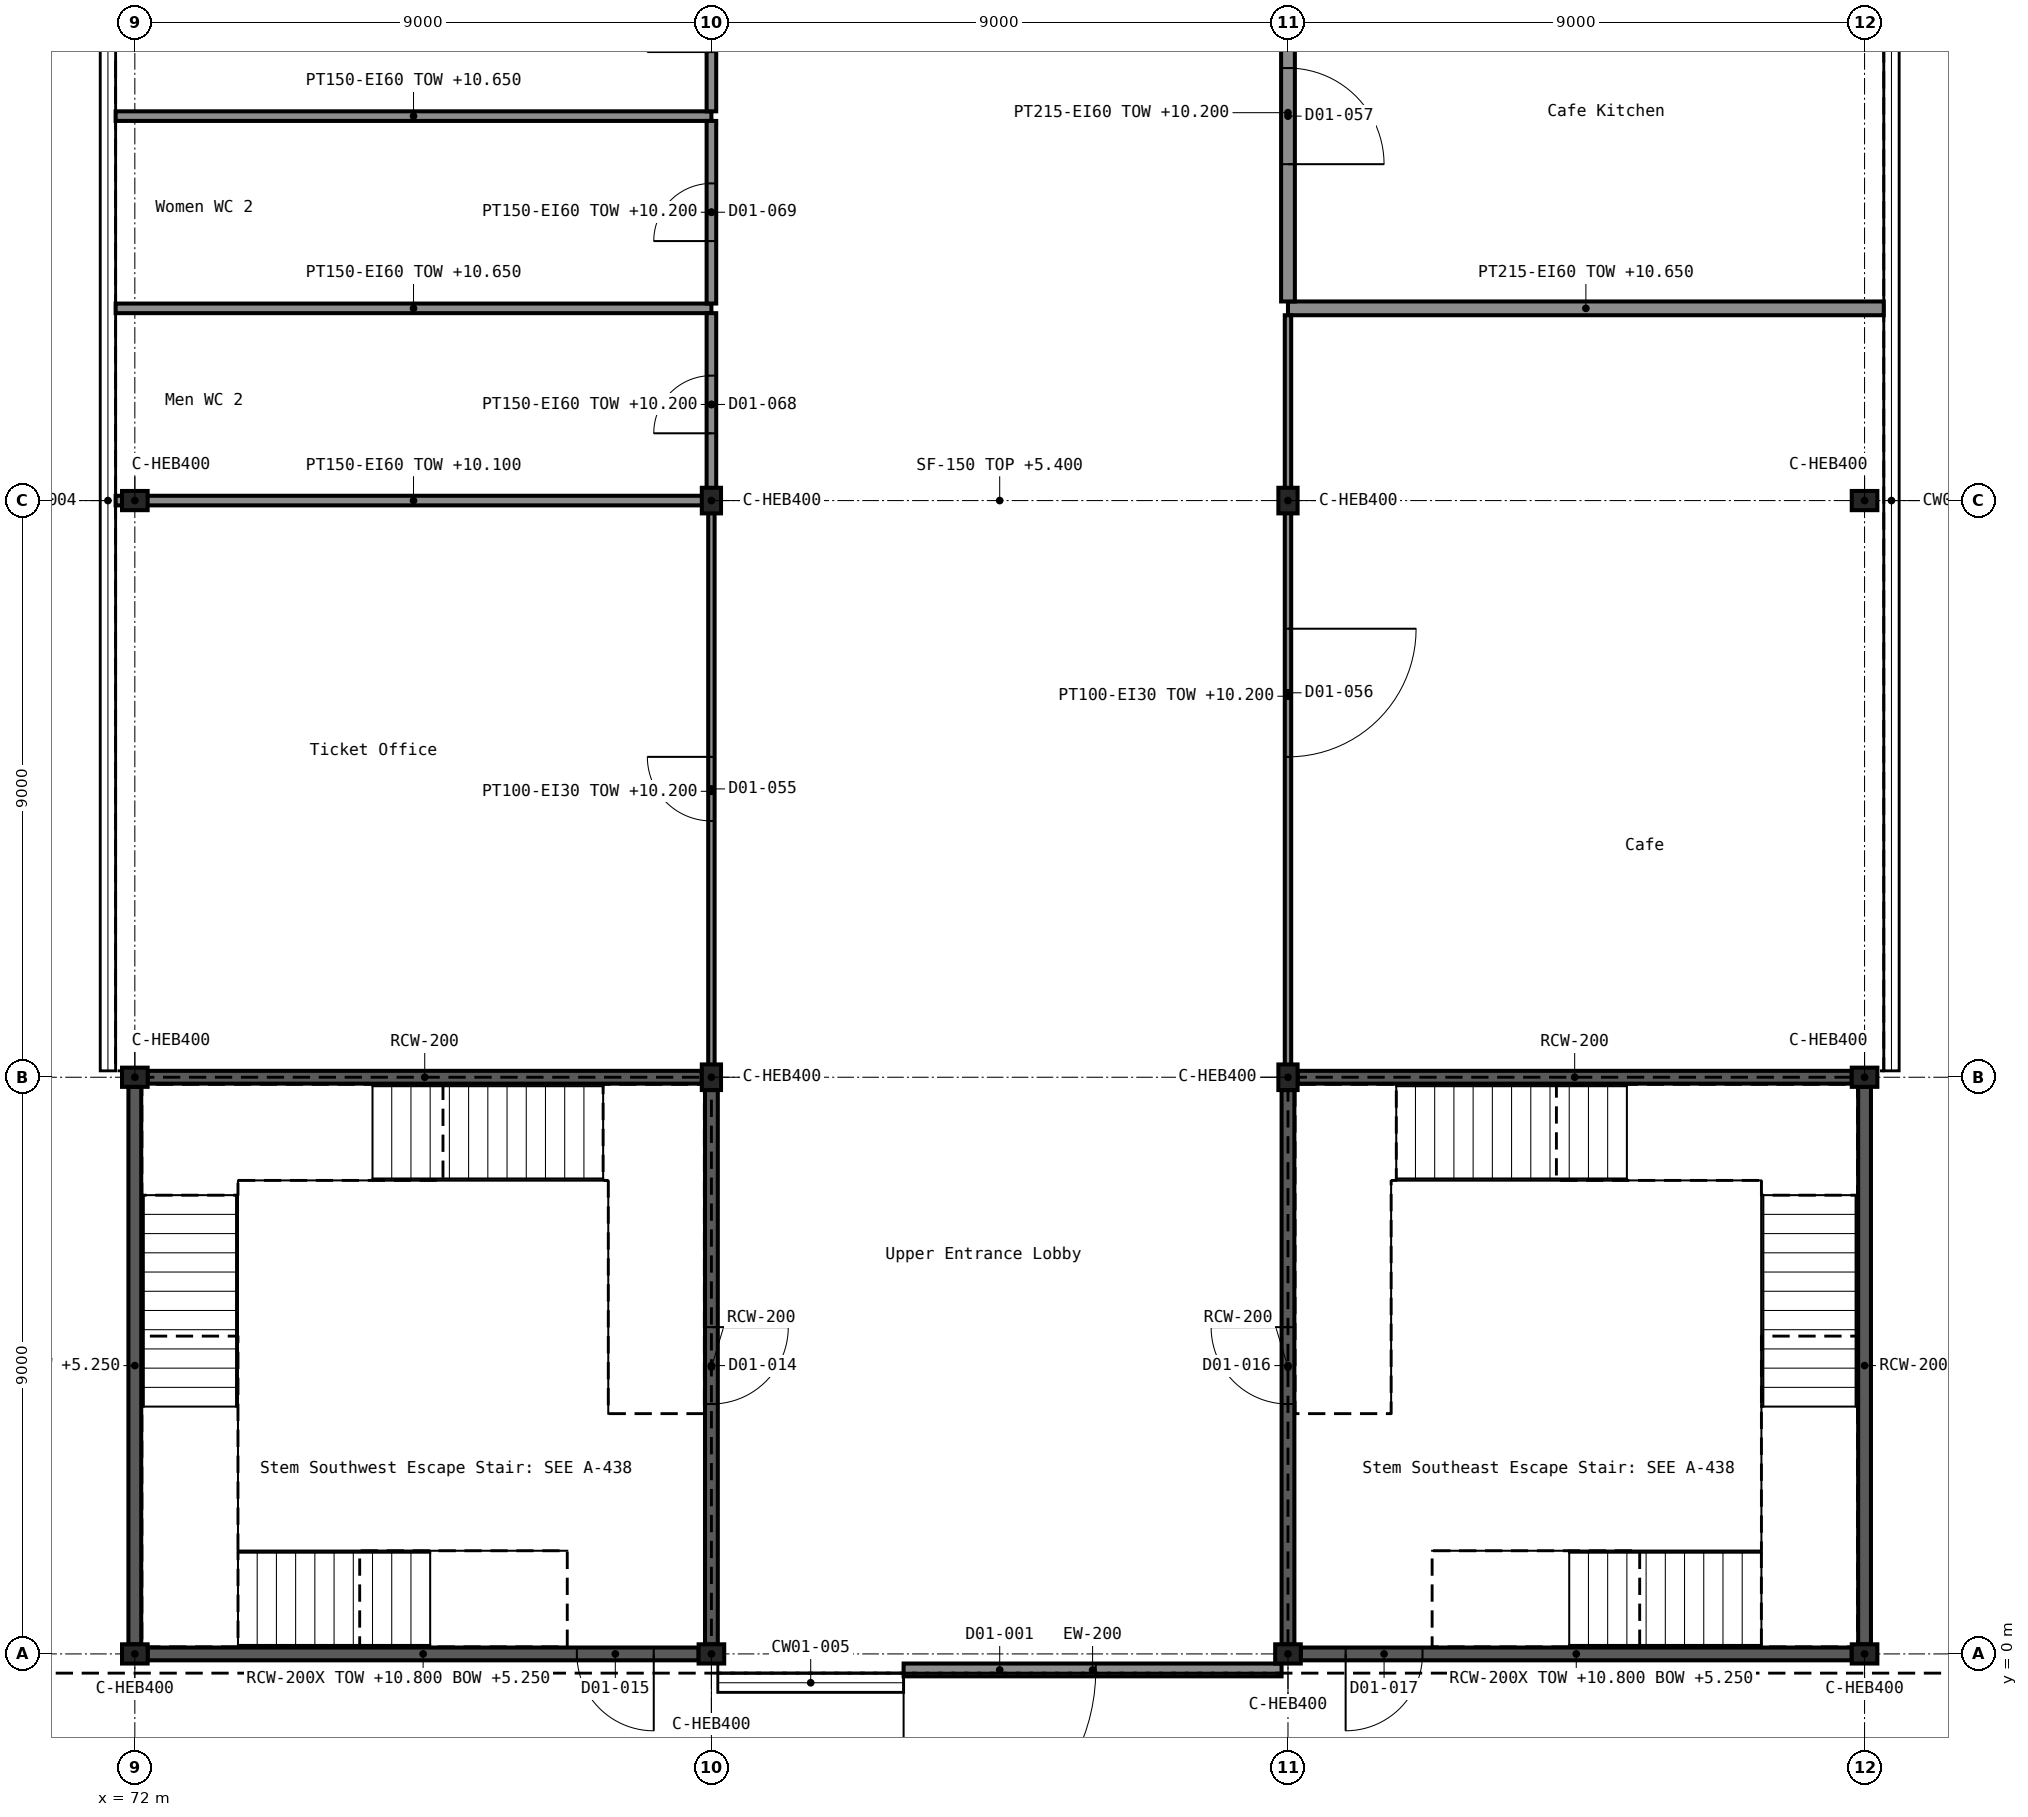
"""IFC4 building model, lengths in metres.
Left out: names, types, materials, properties, quantities, classifications, styles, units other than length and angle.
Written with IfcOpenShell. Run it as: python <this file> out.ifc"""

import sys

from ifc_helpers import new_model, si_unit, direction, frame, frame_2d, origin, origin_2d, place, context, subcontext, project, spatial, rectangle, i_section, extrude, element, fill, save


model = new_model("IFC4")
c1 = context("Model", 3, precision=1e-05, world=origin(), true_north=direction((0.0, 1.0)))
c2 = subcontext(c1, "Body", "Model", "MODEL_VIEW")
j1 = project(units=[si_unit("LENGTHUNIT", "METRE"), si_unit("PLANEANGLEUNIT", "RADIAN")], contexts=[c1])
p1 = place(None, origin())
s1 = spatial("IfcSite", under=j1, at=p1, CompositionType="ELEMENT")
p2 = place(p1, origin())
s2 = spatial("IfcBuilding", under=s1, at=p2, CompositionType="ELEMENT")
p3 = place(p2, frame((0.0, 0.0, 5.4)))
s3 = spatial("IfcBuildingStorey", under=s2, at=p3, CompositionType="ELEMENT", Elevation=5.4)
for number, where, z_axis, x_axis in (
    (1, (72.0, 0.0, 0.0), (0.0, 0.0, 1.0), (0.0, 1.0, 0.0)),
    (2, (81.0, 0.0, 0.0), (0.0, 0.0, 1.0), (0.0, 1.0, 0.0)),
    (3, (90.0, 0.0, 0.0), (0.0, 0.0, 1.0), (0.0, 1.0, 0.0)),
    (4, (99.0, 0.0, 0.0), (0.0, 0.0, 1.0), (0.0, 1.0, 0.0)),
    (5, (72.0, 9.0, 0.0), (0.0, 0.0, 1.0), (0.0, 1.0, 0.0)),
    (6, (81.0, 9.0, 0.0), (0.0, 0.0, 1.0), (1.0, 0.0, 0.0)),
    (7, (90.0, 9.0, 0.0), (0.0, 0.0, 1.0), (1.0, 0.0, 0.0)),
    (8, (99.0, 9.0, 0.0), (0.0, 0.0, 1.0), (0.0, 1.0, 0.0)),
    (9, (72.0, 18.0, 0.0), (0.0, 0.0, 1.0), (0.0, 1.0, 0.0)),
    (10, (81.0, 18.0, 0.0), (0.0, 0.0, 1.0), (1.0, 0.0, 0.0)),
    (11, (90.0, 18.0, 0.0), (0.0, 0.0, 1.0), (1.0, 0.0, 0.0)),
    (12, (99.0, 18.0, 0.0), (0.0, 0.0, 1.0), (0.0, 1.0, 0.0)),
):
    element("IfcColumn", number, at=place(p3, frame(where, z_axis=z_axis, x_axis=x_axis)), inside=s3, PredefinedType="COLUMN", context=c2, shape_type="SweptSolid", body=[
        extrude(i_section(OverallWidth=0.3, OverallDepth=0.4, WebThickness=0.013, FlangeThickness=0.024, FilletRadius=0.027, at=origin_2d()), origin(), (0.0, 0.0, 1.0), 5.4),
    ])
p4 = place(p3, frame((84.0, -0.25, 0.0), z_axis=(0.0, 0.0, 1.0), x_axis=(1.0, 0.0, 0.0)))
e13 = element("IfcWall", 13, at=p4, inside=s3, PredefinedType="SOLIDWALL", context=c2, shape_type="SweptSolid", body=[
    extrude(rectangle(XDim=5.9, YDim=0.2, at=frame_2d((2.95, 0.0))), origin(), (0.0, 0.0, 1.0), 5.4),
])
p5 = place(p4, origin())
e14 = element("IfcOpeningElement", 14, at=p5, cuts=e13, PredefinedType="OPENING", context=c2, shape_type="SweptSolid", body=[
    extrude(rectangle(XDim=3.0, YDim=2.4, at=frame_2d((1.5, 1.2))), frame((0.0, 0.111, 0.0), z_axis=(0.0, -1.0, 0.0), x_axis=(1.0, 0.0, 0.0)), (0.0, 0.0, 1.0), 0.222),
])
p6 = place(p3, frame((72.2, 0.0, -0.15), z_axis=(0.0, 0.0, 1.0), x_axis=(1.0, 0.0, 0.0)))
e15 = element("IfcWall", 15, at=p6, inside=s3, PredefinedType="SHEAR", context=c2, shape_type="SweptSolid", body=[
    extrude(rectangle(XDim=8.6, YDim=0.2, at=frame_2d((4.3, 0.0))), origin(), (0.0, 0.0, 1.0), 5.55),
])
p7 = place(p6, frame((6.7, 0.0, 0.15)))
e16 = element("IfcOpeningElement", 16, at=p7, cuts=e15, PredefinedType="OPENING", context=c2, shape_type="SweptSolid", body=[
    extrude(rectangle(XDim=1.2, YDim=2.1, at=frame_2d((0.6, 1.05))), frame((0.0, 0.111, 0.0), z_axis=(0.0, -1.0, 0.0), x_axis=(1.0, 0.0, 0.0)), (0.0, 0.0, 1.0), 0.222),
])
p8 = place(p3, frame((72.2, 9.0, 0.0), z_axis=(0.0, 0.0, 1.0), x_axis=(1.0, 0.0, 0.0)))
e17 = element("IfcWall", 17, at=p8, inside=s3, PredefinedType="SHEAR", context=c2, shape_type="SweptSolid", body=[
    extrude(rectangle(XDim=8.65, YDim=0.2, at=frame_2d((4.325, 0.0))), origin(), (0.0, 0.0, 1.0), 5.4),
])
p9 = place(p3, frame((72.0, 0.15, -0.15), z_axis=(0.0, 0.0, 1.0), x_axis=(0.0, 1.0, 0.0)))
e18 = element("IfcWall", 18, at=p9, inside=s3, PredefinedType="SHEAR", context=c2, shape_type="SweptSolid", body=[
    extrude(rectangle(XDim=8.7, YDim=0.2, at=frame_2d((4.35, 0.0))), origin(), (0.0, 0.0, 1.0), 5.55),
])
p10 = place(p3, frame((81.0, 0.15, 0.0), z_axis=(0.0, 0.0, 1.0), x_axis=(0.0, 1.0, 0.0)))
e19 = element("IfcWall", 19, at=p10, inside=s3, PredefinedType="SHEAR", context=c2, shape_type="SweptSolid", body=[
    extrude(rectangle(XDim=8.65, YDim=0.2, at=frame_2d((4.325, 0.0))), origin(), (0.0, 0.0, 1.0), 5.4),
])
p11 = place(p10, frame((3.75, 0.0, 0.0)))
e20 = element("IfcOpeningElement", 20, at=p11, cuts=e19, PredefinedType="OPENING", context=c2, shape_type="SweptSolid", body=[
    extrude(rectangle(XDim=1.2, YDim=2.1, at=frame_2d((0.6, 1.05))), frame((0.0, 0.111, 0.0), z_axis=(0.0, -1.0, 0.0), x_axis=(1.0, 0.0, 0.0)), (0.0, 0.0, 1.0), 0.222),
])
p12 = place(p3, frame((90.2, 0.0, -0.15), z_axis=(0.0, 0.0, 1.0), x_axis=(1.0, 0.0, 0.0)))
e21 = element("IfcWall", 21, at=p12, inside=s3, PredefinedType="SHEAR", context=c2, shape_type="SweptSolid", body=[
    extrude(rectangle(XDim=8.6, YDim=0.2, at=frame_2d((4.3, 0.0))), origin(), (0.0, 0.0, 1.0), 5.55),
])
p13 = place(p12, frame((0.7, 0.0, 0.15)))
e22 = element("IfcOpeningElement", 22, at=p13, cuts=e21, PredefinedType="OPENING", context=c2, shape_type="SweptSolid", body=[
    extrude(rectangle(XDim=1.2, YDim=2.1, at=frame_2d((0.6, 1.05))), frame((0.0, 0.111, 0.0), z_axis=(0.0, -1.0, 0.0), x_axis=(1.0, 0.0, 0.0)), (0.0, 0.0, 1.0), 0.222),
])
p14 = place(p3, frame((90.15, 9.0, 0.0), z_axis=(0.0, 0.0, 1.0), x_axis=(1.0, 0.0, 0.0)))
e23 = element("IfcWall", 23, at=p14, inside=s3, PredefinedType="SHEAR", context=c2, shape_type="SweptSolid", body=[
    extrude(rectangle(XDim=8.65, YDim=0.2, at=frame_2d((4.325, 0.0))), origin(), (0.0, 0.0, 1.0), 5.4),
])
p15 = place(p3, frame((90.0, 0.15, 0.0), z_axis=(0.0, 0.0, 1.0), x_axis=(0.0, 1.0, 0.0)))
e24 = element("IfcWall", 24, at=p15, inside=s3, PredefinedType="SHEAR", context=c2, shape_type="SweptSolid", body=[
    extrude(rectangle(XDim=8.65, YDim=0.2, at=frame_2d((4.325, 0.0))), origin(), (0.0, 0.0, 1.0), 5.4),
])
p16 = place(p15, frame((3.75, 0.0, 0.0)))
e25 = element("IfcOpeningElement", 25, at=p16, cuts=e24, PredefinedType="OPENING", context=c2, shape_type="SweptSolid", body=[
    extrude(rectangle(XDim=1.2, YDim=2.1, at=frame_2d((0.6, 1.05))), frame((0.0, 0.111, 0.0), z_axis=(0.0, -1.0, 0.0), x_axis=(1.0, 0.0, 0.0)), (0.0, 0.0, 1.0), 0.222),
])
p17 = place(p3, frame((99.0, 0.15, -0.15), z_axis=(0.0, 0.0, 1.0), x_axis=(0.0, 1.0, 0.0)))
e26 = element("IfcWall", 26, at=p17, inside=s3, PredefinedType="SHEAR", context=c2, shape_type="SweptSolid", body=[
    extrude(rectangle(XDim=8.7, YDim=0.2, at=frame_2d((4.35, 0.0))), origin(), (0.0, 0.0, 1.0), 5.55),
])
p18 = place(p3, frame((90.0, 21.0, 0.0), z_axis=(0.0, 0.0, 1.0), x_axis=(1.0, 0.0, 0.0)))
e27 = element("IfcWall", 27, at=p18, inside=s3, PredefinedType="PARTITIONING", context=c2, shape_type="SweptSolid", body=[
    extrude(rectangle(XDim=9.3, YDim=0.215, at=frame_2d((4.65, 0.0))), origin(), (0.0, 0.0, 1.0), 5.25),
])
p19 = place(p3, frame((90.0, 21.107, 0.0), z_axis=(0.0, 0.0, 1.0), x_axis=(0.0, 1.0, 0.0)))
e28 = element("IfcWall", 28, at=p19, inside=s3, PredefinedType="PARTITIONING", context=c2, shape_type="SweptSolid", body=[
    extrude(rectangle(XDim=5.893, YDim=0.215, at=frame_2d((2.946, 0.0))), origin(), (0.0, 0.0, 1.0), 4.8),
])
p20 = place(p19, frame((2.143, 0.0, 0.0)))
e29 = element("IfcOpeningElement", 29, at=p20, cuts=e28, PredefinedType="OPENING", context=c2, shape_type="SweptSolid", body=[
    extrude(rectangle(XDim=1.5, YDim=2.1, at=frame_2d((0.75, 1.05))), frame((0.0, 0.119, 0.0), z_axis=(0.0, -1.0, 0.0), x_axis=(1.0, 0.0, 0.0)), (0.0, 0.0, 1.0), 0.237),
])
p21 = place(p3, frame((71.7, 18.0, 0.0), z_axis=(0.0, 0.0, 1.0), x_axis=(1.0, 0.0, 0.0)))
e30 = element("IfcWall", 30, at=p21, inside=s3, PredefinedType="PARTITIONING", context=c2, shape_type="SweptSolid", body=[
    extrude(rectangle(XDim=9.3, YDim=0.15, at=frame_2d((4.65, 0.0))), origin(), (0.0, 0.0, 1.0), 4.7),
])
for number, where, z_axis, x_axis in (
    (31, (71.7, 21.0, 0.0), (0.0, 0.0, 1.0), (1.0, 0.0, 0.0)),
    (32, (71.7, 24.0, 0.0), (0.0, 0.0, 1.0), (1.0, 0.0, 0.0)),
):
    element("IfcWall", number, at=place(p3, frame(where, z_axis=z_axis, x_axis=x_axis)), inside=s3, PredefinedType="PARTITIONING", context=c2, shape_type="SweptSolid", body=[
        extrude(rectangle(XDim=9.3, YDim=0.15, at=frame_2d((4.65, 0.0))), origin(), (0.0, 0.0, 1.0), 5.25),
    ])
p22 = place(p3, frame((81.0, 18.075, 0.0), z_axis=(0.0, 0.0, 1.0), x_axis=(0.0, 1.0, 0.0)))
e33 = element("IfcWall", 33, at=p22, inside=s3, PredefinedType="PARTITIONING", context=c2, shape_type="SweptSolid", body=[
    extrude(rectangle(XDim=2.85, YDim=0.15, at=frame_2d((1.425, 0.0))), origin(), (0.0, 0.0, 1.0), 4.8),
])
p23 = place(p22, frame((0.975, 0.0, 0.0)))
e34 = element("IfcOpeningElement", 34, at=p23, cuts=e33, PredefinedType="OPENING", context=c2, shape_type="SweptSolid", body=[
    extrude(rectangle(XDim=0.9, YDim=2.1, at=frame_2d((0.45, 1.05))), frame((0.0, 0.086, 0.0), z_axis=(0.0, -1.0, 0.0), x_axis=(1.0, 0.0, 0.0)), (0.0, 0.0, 1.0), 0.172),
])
p24 = place(p3, frame((81.0, 21.075, 0.0), z_axis=(0.0, 0.0, 1.0), x_axis=(0.0, 1.0, 0.0)))
e35 = element("IfcWall", 35, at=p24, inside=s3, PredefinedType="PARTITIONING", context=c2, shape_type="SweptSolid", body=[
    extrude(rectangle(XDim=2.85, YDim=0.15, at=frame_2d((1.425, 0.0))), origin(), (0.0, 0.0, 1.0), 4.8),
])
p25 = place(p24, frame((0.975, 0.0, 0.0)))
e36 = element("IfcOpeningElement", 36, at=p25, cuts=e35, PredefinedType="OPENING", context=c2, shape_type="SweptSolid", body=[
    extrude(rectangle(XDim=0.9, YDim=2.1, at=frame_2d((0.45, 1.05))), frame((0.0, 0.086, 0.0), z_axis=(0.0, -1.0, 0.0), x_axis=(1.0, 0.0, 0.0)), (0.0, 0.0, 1.0), 0.172),
])
p26 = place(p3, frame((81.0, 24.075, 0.0), z_axis=(0.0, 0.0, 1.0), x_axis=(0.0, 1.0, 0.0)))
e37 = element("IfcWall", 37, at=p26, inside=s3, PredefinedType="PARTITIONING", context=c2, shape_type="SweptSolid", body=[
    extrude(rectangle(XDim=2.925, YDim=0.15, at=frame_2d((1.462, 0.0))), origin(), (0.0, 0.0, 1.0), 4.8),
])
p27 = place(p26, frame((0.925, 0.0, 0.0)))
e38 = element("IfcOpeningElement", 38, at=p27, cuts=e37, PredefinedType="OPENING", context=c2, shape_type="SweptSolid", body=[
    extrude(rectangle(XDim=1.0, YDim=2.1, at=frame_2d((0.5, 1.05))), frame((0.0, 0.086, 0.0), z_axis=(0.0, -1.0, 0.0), x_axis=(1.0, 0.0, 0.0)), (0.0, 0.0, 1.0), 0.172),
])
p28 = place(p3, frame((81.0, 9.0, 0.0), z_axis=(0.0, 0.0, 1.0), x_axis=(0.0, 1.0, 0.0)))
e39 = element("IfcWall", 39, at=p28, inside=s3, PredefinedType="PARTITIONING", context=c2, shape_type="SweptSolid", body=[
    extrude(rectangle(XDim=8.925, YDim=0.1, at=frame_2d((4.462, 0.0))), origin(), (0.0, 0.0, 1.0), 4.8),
])
p29 = place(p28, frame((4.0, 0.0, 0.0)))
e40 = element("IfcOpeningElement", 40, at=p29, cuts=e39, PredefinedType="OPENING", context=c2, shape_type="SweptSolid", body=[
    extrude(rectangle(XDim=1.0, YDim=2.4, at=frame_2d((0.5, 1.2))), frame((0.0, 0.061, 0.0), z_axis=(0.0, -1.0, 0.0), x_axis=(1.0, 0.0, 0.0)), (0.0, 0.0, 1.0), 0.122),
])
p30 = place(p3, frame((90.0, 9.0, 0.0), z_axis=(0.0, 0.0, 1.0), x_axis=(0.0, 1.0, 0.0)))
e41 = element("IfcWall", 41, at=p30, inside=s3, PredefinedType="PARTITIONING", context=c2, shape_type="SweptSolid", body=[
    extrude(rectangle(XDim=11.893, YDim=0.1, at=frame_2d((5.946, 0.0))), origin(), (0.0, 0.0, 1.0), 4.8),
])
p31 = place(p30, frame((5.0, 0.0, 0.0)))
e42 = element("IfcOpeningElement", 42, at=p31, cuts=e41, PredefinedType="OPENING", context=c2, shape_type="SweptSolid", body=[
    extrude(rectangle(XDim=2.0, YDim=2.1, at=frame_2d((1.0, 1.05))), frame((0.0, 0.061, 0.0), z_axis=(0.0, -1.0, 0.0), x_axis=(1.0, 0.0, 0.0)), (0.0, 0.0, 1.0), 0.122),
])
p32 = place(p5, frame((3.0, 0.0, 0.0), z_axis=(0.0, 0.0, 1.0), x_axis=(-1.0, 0.0, 0.0)))
e43 = element("IfcDoor", 43, at=p32, inside=s3, OperationType="DOUBLE_DOOR_DOUBLE_SWING", PredefinedType="DOOR", context=c2, shape_type="SweptSolid", body=[
    extrude(rectangle(XDim=3.0, YDim=2.4, at=frame_2d((1.5, 1.2))), frame((0.0, 0.025, 0.0), z_axis=(0.0, -1.0, 0.0), x_axis=(1.0, 0.0, 0.0)), (0.0, 0.0, 1.0), 0.05),
])
fill(e14, e43)
p33 = place(p11, frame((1.2, 0.0, 0.0), z_axis=(0.0, 0.0, 1.0), x_axis=(-1.0, 0.0, 0.0)))
e44 = element("IfcDoor", 44, at=p33, inside=s3, OperationType="SINGLE_SWING_LEFT", PredefinedType="DOOR", context=c2, shape_type="SweptSolid", body=[
    extrude(rectangle(XDim=1.2, YDim=2.1, at=frame_2d((0.6, 1.05))), frame((0.0, 0.025, 0.0), z_axis=(0.0, -1.0, 0.0), x_axis=(1.0, 0.0, 0.0)), (0.0, 0.0, 1.0), 0.05),
])
fill(e20, e44)
p34 = place(p7, frame((1.2, 0.0, 0.0), z_axis=(0.0, 0.0, 1.0), x_axis=(-1.0, 0.0, 0.0)))
e45 = element("IfcDoor", 45, at=p34, inside=s3, OperationType="SINGLE_SWING_LEFT", PredefinedType="DOOR", context=c2, shape_type="SweptSolid", body=[
    extrude(rectangle(XDim=1.2, YDim=2.1, at=frame_2d((0.6, 1.05))), frame((0.0, 0.025, 0.0), z_axis=(0.0, -1.0, 0.0), x_axis=(1.0, 0.0, 0.0)), (0.0, 0.0, 1.0), 0.05),
])
fill(e16, e45)
p35 = place(p16, origin())
e46 = element("IfcDoor", 46, at=p35, inside=s3, OperationType="SINGLE_SWING_RIGHT", PredefinedType="DOOR", context=c2, shape_type="SweptSolid", body=[
    extrude(rectangle(XDim=1.2, YDim=2.1, at=frame_2d((0.6, 1.05))), frame((0.0, 0.025, 0.0), z_axis=(0.0, -1.0, 0.0), x_axis=(1.0, 0.0, 0.0)), (0.0, 0.0, 1.0), 0.05),
])
fill(e25, e46)
p36 = place(p13, frame((1.2, 0.0, 0.0), z_axis=(0.0, 0.0, 1.0), x_axis=(-1.0, 0.0, 0.0)))
e47 = element("IfcDoor", 47, at=p36, inside=s3, OperationType="SINGLE_SWING_RIGHT", PredefinedType="DOOR", context=c2, shape_type="SweptSolid", body=[
    extrude(rectangle(XDim=1.2, YDim=2.1, at=frame_2d((0.6, 1.05))), frame((0.0, 0.025, 0.0), z_axis=(0.0, -1.0, 0.0), x_axis=(1.0, 0.0, 0.0)), (0.0, 0.0, 1.0), 0.05),
])
fill(e22, e47)
p37 = place(p29, origin())
e48 = element("IfcDoor", 48, at=p37, inside=s3, OperationType="SINGLE_SWING_RIGHT", PredefinedType="DOOR", context=c2, shape_type="SweptSolid", body=[
    extrude(rectangle(XDim=1.0, YDim=2.4, at=frame_2d((0.5, 1.2))), frame((0.0, 0.025, 0.0), z_axis=(0.0, -1.0, 0.0), x_axis=(1.0, 0.0, 0.0)), (0.0, 0.0, 1.0), 0.05),
])
fill(e40, e48)
p38 = place(p31, frame((2.0, 0.0, 0.0), z_axis=(0.0, 0.0, 1.0), x_axis=(-1.0, 0.0, 0.0)))
e49 = element("IfcDoor", 49, at=p38, inside=s3, OperationType="DOUBLE_DOOR_SINGLE_SWING", PredefinedType="DOOR", context=c2, shape_type="SweptSolid", body=[
    extrude(rectangle(XDim=2.0, YDim=2.1, at=frame_2d((1.0, 1.05))), frame((0.0, 0.025, 0.0), z_axis=(0.0, -1.0, 0.0), x_axis=(1.0, 0.0, 0.0)), (0.0, 0.0, 1.0), 0.05),
])
fill(e42, e49)
p39 = place(p20, frame((1.5, 0.0, 0.0), z_axis=(0.0, 0.0, 1.0), x_axis=(-1.0, 0.0, 0.0)))
e50 = element("IfcDoor", 50, at=p39, inside=s3, OperationType="DOUBLE_DOOR_SINGLE_SWING", PredefinedType="DOOR", context=c2, shape_type="SweptSolid", body=[
    extrude(rectangle(XDim=1.5, YDim=2.1, at=frame_2d((0.75, 1.05))), frame((0.0, 0.025, 0.0), z_axis=(0.0, -1.0, 0.0), x_axis=(1.0, 0.0, 0.0)), (0.0, 0.0, 1.0), 0.05),
])
fill(e29, e50)
p40 = place(p23, origin())
e51 = element("IfcDoor", 51, at=p40, inside=s3, OperationType="SINGLE_SWING_LEFT", PredefinedType="DOOR", context=c2, shape_type="SweptSolid", body=[
    extrude(rectangle(XDim=0.9, YDim=2.1, at=frame_2d((0.45, 1.05))), frame((0.0, 0.025, 0.0), z_axis=(0.0, -1.0, 0.0), x_axis=(1.0, 0.0, 0.0)), (0.0, 0.0, 1.0), 0.05),
])
fill(e34, e51)
p41 = place(p25, origin())
e52 = element("IfcDoor", 52, at=p41, inside=s3, OperationType="SINGLE_SWING_LEFT", PredefinedType="DOOR", context=c2, shape_type="SweptSolid", body=[
    extrude(rectangle(XDim=0.9, YDim=2.1, at=frame_2d((0.45, 1.05))), frame((0.0, 0.025, 0.0), z_axis=(0.0, -1.0, 0.0), x_axis=(1.0, 0.0, 0.0)), (0.0, 0.0, 1.0), 0.05),
])
fill(e36, e52)
save(model, sys.argv[1])
